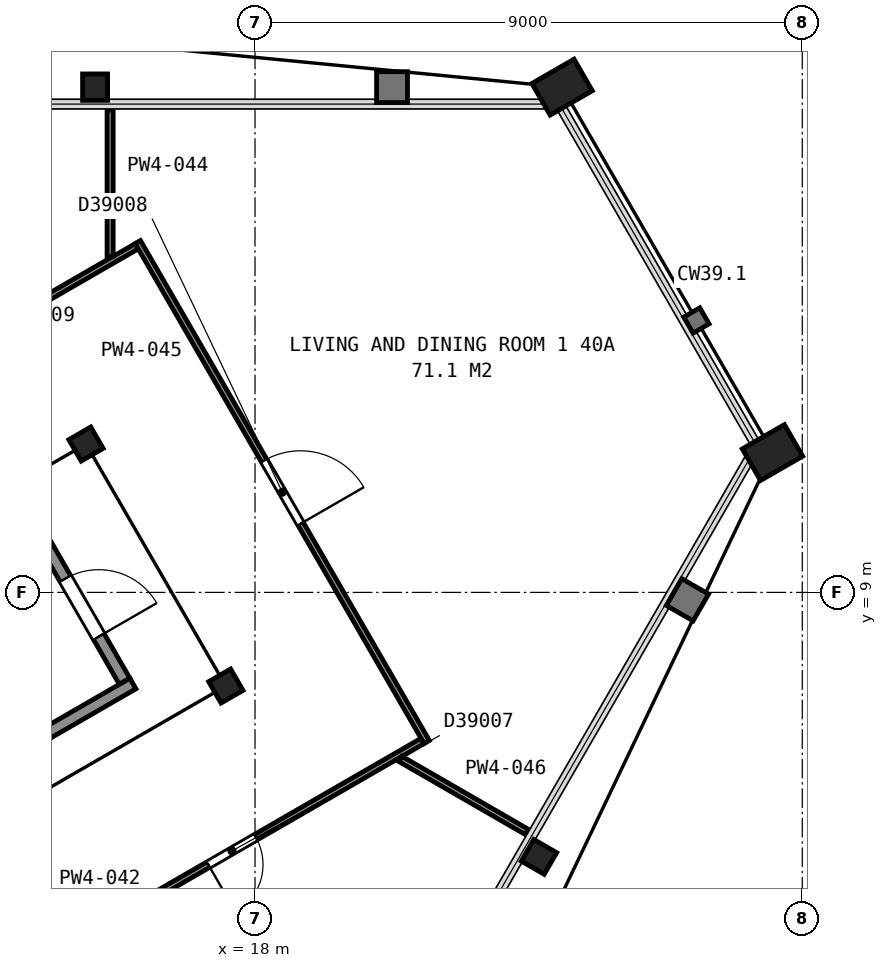
"""IFC4 building model, lengths in metres.
Left out: names, types, materials, properties, quantities, classifications, styles, units other than length and angle.
Written with IfcOpenShell. Run it as: python <this file> out.ifc"""

import sys

from ifc_helpers import new_model, si_unit, direction, frame, frame_2d, origin, origin_2d, place, context, subcontext, project, spatial, rectangle, hollow_rectangle, i_section, extrude, element, fill, save


model = new_model("IFC4")
c1 = context("Model", 3, precision=1e-05, world=origin(), true_north=direction((0.0, 1.0)))
c2 = subcontext(c1, "Body", "Model", "MODEL_VIEW")
j1 = project(units=[si_unit("LENGTHUNIT", "METRE"), si_unit("PLANEANGLEUNIT", "RADIAN")], contexts=[c1])
p1 = place(None, origin())
s1 = spatial("IfcSite", under=j1, at=p1, CompositionType="ELEMENT")
p2 = place(p1, origin())
s2 = spatial("IfcBuilding", under=s1, at=p2, CompositionType="ELEMENT")
p3 = place(p2, frame((0.0, 0.0, 163.6)))
s3 = spatial("IfcBuildingStorey", under=s2, at=p3, CompositionType="ELEMENT", Elevation=163.6)
p4 = place(p3, frame((23.05, 17.31, 0.0), z_axis=(0.0, 0.0, 1.0), x_axis=(0.5, -0.866025403784, 0.0)))
e1 = element("IfcColumn", 1, at=p4, inside=s3, PredefinedType="COLUMN", context=c2, shape_type="SweptSolid", body=[
    extrude(hollow_rectangle(XDim=0.6, YDim=0.8, WallThickness=0.05, at=origin_2d()), origin(), (0.0, 0.0, 1.0), 3.7),
])
for number, where, z_axis, x_axis in (
    (2, (15.37, 17.31, 0.0), (0.0, 0.0, 1.0), (1.0, 0.0, 0.0)),
    (3, (22.67, 4.65, 0.0), (0.0, 0.0, 1.0), (-0.5, -0.866, 0.0)),
):
    element("IfcColumn", number, at=place(p3, frame(where, z_axis=z_axis, x_axis=x_axis)), inside=s3, PredefinedType="COLUMN", context=c2, shape_type="SweptSolid", body=[
        extrude(i_section(OverallWidth=0.411, OverallDepth=0.434, WebThickness=0.036, FlangeThickness=0.057, FilletRadius=0.015, at=origin_2d()), origin(), (0.0, 0.0, 1.0), 3.7),
    ])
p5 = place(p3, frame((26.51, 11.3, 0.0), z_axis=(0.0, 0.0, 1.0), x_axis=(0.5, -0.866025403784, 0.0)))
e4 = element("IfcColumn", 4, at=p5, inside=s3, PredefinedType="COLUMN", context=c2, shape_type="SweptSolid", body=[
    extrude(hollow_rectangle(XDim=0.6, YDim=0.8, WallThickness=0.05, at=origin_2d()), origin(), (0.0, 0.0, 1.0), 3.7),
])
for number, where, z_axis, x_axis in (
    (5, (17.52, 7.46, 0.0), (0.0, 0.0, 1.0), (0.5, -0.866, 0.0)),
    (6, (15.22, 11.44, 0.0), (0.0, 0.0, 1.0), (0.5, -0.866, 0.0)),
):
    element("IfcColumn", number, at=place(p3, frame(where, z_axis=z_axis, x_axis=x_axis)), inside=s3, PredefinedType="COLUMN", context=c2, shape_type="SweptSolid", body=[
        extrude(i_section(OverallWidth=0.406, OverallDepth=0.417, WebThickness=0.03, FlangeThickness=0.048, FilletRadius=0.015, at=origin_2d()), origin(), (0.0, 0.0, 1.0), 3.7),
    ])
p6 = place(p3, frame((15.855, 7.538, 0.0), z_axis=(0.0, 0.0, 1.0), x_axis=(-0.500049511043, 0.865996816683, 0.0)))
e7 = element("IfcWall", 7, at=p6, inside=s3, PredefinedType="PARTITIONING", context=c2, shape_type="SweptSolid", body=[
    extrude(rectangle(XDim=2.8, YDim=0.2, at=frame_2d((1.4, 0.0))), origin(), (0.0, 0.0, 1.0), 3.45),
])
p7 = place(p6, frame((0.85, 0.0, 0.0)))
e8 = element("IfcOpeningElement", 8, at=p7, cuts=e7, PredefinedType="OPENING", context=c2, shape_type="SweptSolid", body=[
    extrude(rectangle(XDim=1.1, YDim=2.1, at=frame_2d((0.55, 1.05))), frame((0.0, 0.11, 0.0), z_axis=(0.0, -1.0, 0.0), x_axis=(1.0, 0.0, 0.0)), (0.0, 0.0, 1.0), 0.22),
])
p8 = place(p3, frame((7.678, 2.701, 0.0), z_axis=(0.0, 0.0, 1.0), x_axis=(0.866019993635, 0.500009370536, 0.0)))
e9 = element("IfcWall", 9, at=p8, inside=s3, PredefinedType="PARTITIONING", context=c2, shape_type="SweptSolid", body=[
    extrude(rectangle(XDim=9.6, YDim=0.2, at=frame_2d((4.8, 0.0))), origin(), (0.0, 0.0, 1.0), 3.45),
])
p9 = place(p3, frame((8.691, 10.442, 0.0), z_axis=(0.0, 0.0, 1.0), x_axis=(0.866070360466, 0.499922124658, 0.0)))
e10 = element("IfcWall", 10, at=p9, inside=s3, PredefinedType="PARTITIONING", context=c2, shape_type="SweptSolid", body=[
    extrude(rectangle(XDim=8.503, YDim=0.1, at=frame_2d((4.251, 0.0))), origin(), (0.0, 0.0, 1.0), 2.713),
])
p10 = place(p9, frame((4.758, 0.0, 0.0)))
e11 = element("IfcOpeningElement", 11, at=p10, cuts=e10, PredefinedType="OPENING", context=c2, shape_type="SweptSolid", body=[
    extrude(rectangle(XDim=0.9, YDim=2.1, at=frame_2d((0.45, 1.05))), frame((0.0, 0.06, 0.0), z_axis=(0.0, -1.0, 0.0), x_axis=(1.0, 0.0, 0.0)), (0.0, 0.0, 1.0), 0.12),
])
p11 = place(p9, frame((0.715, 0.0, 0.0)))
e12 = element("IfcOpeningElement", 12, at=p11, cuts=e10, PredefinedType="OPENING", context=c2, shape_type="SweptSolid", body=[
    extrude(rectangle(XDim=0.9, YDim=2.1, at=frame_2d((0.45, 1.05))), frame((0.0, 0.06, 0.0), z_axis=(0.0, -1.0, 0.0), x_axis=(1.0, 0.0, 0.0)), (0.0, 0.0, 1.0), 0.12),
])
p12 = place(p3, frame((20.756, 6.557, 0.0), z_axis=(0.0, 0.0, 1.0), x_axis=(-0.866069146081, -0.499924228466, 0.0)))
e13 = element("IfcWall", 13, at=p12, inside=s3, PredefinedType="PARTITIONING", context=c2, shape_type="SweptSolid", body=[
    extrude(rectangle(XDim=8.519, YDim=0.1, at=frame_2d((4.259, 0.0))), origin(), (0.0, 0.0, 1.0), 2.713),
])
p13 = place(p12, frame((7.239, 0.0, 0.0)))
e14 = element("IfcOpeningElement", 14, at=p13, cuts=e13, PredefinedType="OPENING", context=c2, shape_type="SweptSolid", body=[
    extrude(rectangle(XDim=0.9, YDim=2.1, at=frame_2d((0.45, 1.05))), frame((0.0, 0.06, 0.0), z_axis=(0.0, -1.0, 0.0), x_axis=(1.0, 0.0, 0.0)), (0.0, 0.0, 1.0), 0.12),
])
p14 = place(p12, frame((3.169, 0.0, 0.0)))
e15 = element("IfcOpeningElement", 15, at=p14, cuts=e13, PredefinedType="OPENING", context=c2, shape_type="SweptSolid", body=[
    extrude(rectangle(XDim=0.9, YDim=2.1, at=frame_2d((0.45, 1.05))), frame((0.0, 0.06, 0.0), z_axis=(0.0, -1.0, 0.0), x_axis=(1.0, 0.0, 0.0)), (0.0, 0.0, 1.0), 0.12),
])
p15 = place(p3, frame((15.617, 14.527, 0.0), z_axis=(0.0, 0.0, 1.0), x_axis=(0.0, 1.0, 0.0)))
e16 = element("IfcWall", 16, at=p15, inside=s3, PredefinedType="PARTITIONING", context=c2, shape_type="SweptSolid", body=[
    extrude(rectangle(XDim=2.408, YDim=0.1, at=frame_2d((1.204, 0.0))), origin(), (0.0, 0.0, 1.0), 2.713),
])
p16 = place(p3, frame((16.073, 14.761, 0.0), z_axis=(0.0, 0.0, 1.0), x_axis=(0.500297300687, -0.865853689098, 0.0)))
e17 = element("IfcWall", 17, at=p16, inside=s3, PredefinedType="PARTITIONING", context=c2, shape_type="SweptSolid", body=[
    extrude(rectangle(XDim=9.496, YDim=0.1, at=frame_2d((4.748, 0.0))), origin(), (0.0, 0.0, 1.0), 2.713),
])
p17 = place(p16, frame((4.15, 0.0, 0.0)))
e18 = element("IfcOpeningElement", 18, at=p17, cuts=e17, PredefinedType="OPENING", context=c2, shape_type="SweptSolid", body=[
    extrude(rectangle(XDim=1.2, YDim=2.1, at=frame_2d((0.6, 1.05))), frame((0.0, 0.06, 0.0), z_axis=(0.0, -1.0, 0.0), x_axis=(1.0, 0.0, 0.0)), (0.0, 0.0, 1.0), 0.12),
])
p18 = place(p3, frame((20.392, 6.261, 0.0), z_axis=(0.0, 0.0, 1.0), x_axis=(0.865953976614, -0.500123695086, 0.0)))
e19 = element("IfcWall", 19, at=p18, inside=s3, PredefinedType="PARTITIONING", context=c2, shape_type="SweptSolid", body=[
    extrude(rectangle(XDim=2.405, YDim=0.1, at=frame_2d((1.203, 0.0))), origin(), (0.0, 0.0, 1.0), 2.713),
])
p19 = place(p7, origin())
e20 = element("IfcDoor", 20, at=p19, inside=s3, OperationType="SINGLE_SWING_LEFT", PredefinedType="DOOR", context=c2, shape_type="SweptSolid", body=[
    extrude(rectangle(XDim=1.1, YDim=2.1, at=frame_2d((0.55, 1.05))), frame((0.0, 0.025, 0.0), z_axis=(0.0, -1.0, 0.0), x_axis=(1.0, 0.0, 0.0)), (0.0, 0.0, 1.0), 0.05),
])
fill(e8, e20)
p20 = place(p14, origin())
e21 = element("IfcDoor", 21, at=p20, inside=s3, OperationType="SINGLE_SWING_RIGHT", PredefinedType="DOOR", context=c2, shape_type="SweptSolid", body=[
    extrude(rectangle(XDim=0.9, YDim=2.1, at=frame_2d((0.45, 1.05))), frame((0.0, 0.025, 0.0), z_axis=(0.0, -1.0, 0.0), x_axis=(1.0, 0.0, 0.0)), (0.0, 0.0, 1.0), 0.05),
])
fill(e15, e21)
p21 = place(p17, origin())
e22 = element("IfcDoor", 22, at=p21, inside=s3, OperationType="SINGLE_SWING_RIGHT", PredefinedType="DOOR", context=c2, shape_type="SweptSolid", body=[
    extrude(rectangle(XDim=1.2, YDim=2.1, at=frame_2d((0.6, 1.05))), frame((0.0, 0.025, 0.0), z_axis=(0.0, -1.0, 0.0), x_axis=(1.0, 0.0, 0.0)), (0.0, 0.0, 1.0), 0.05),
])
fill(e18, e22)
save(model, sys.argv[1])
